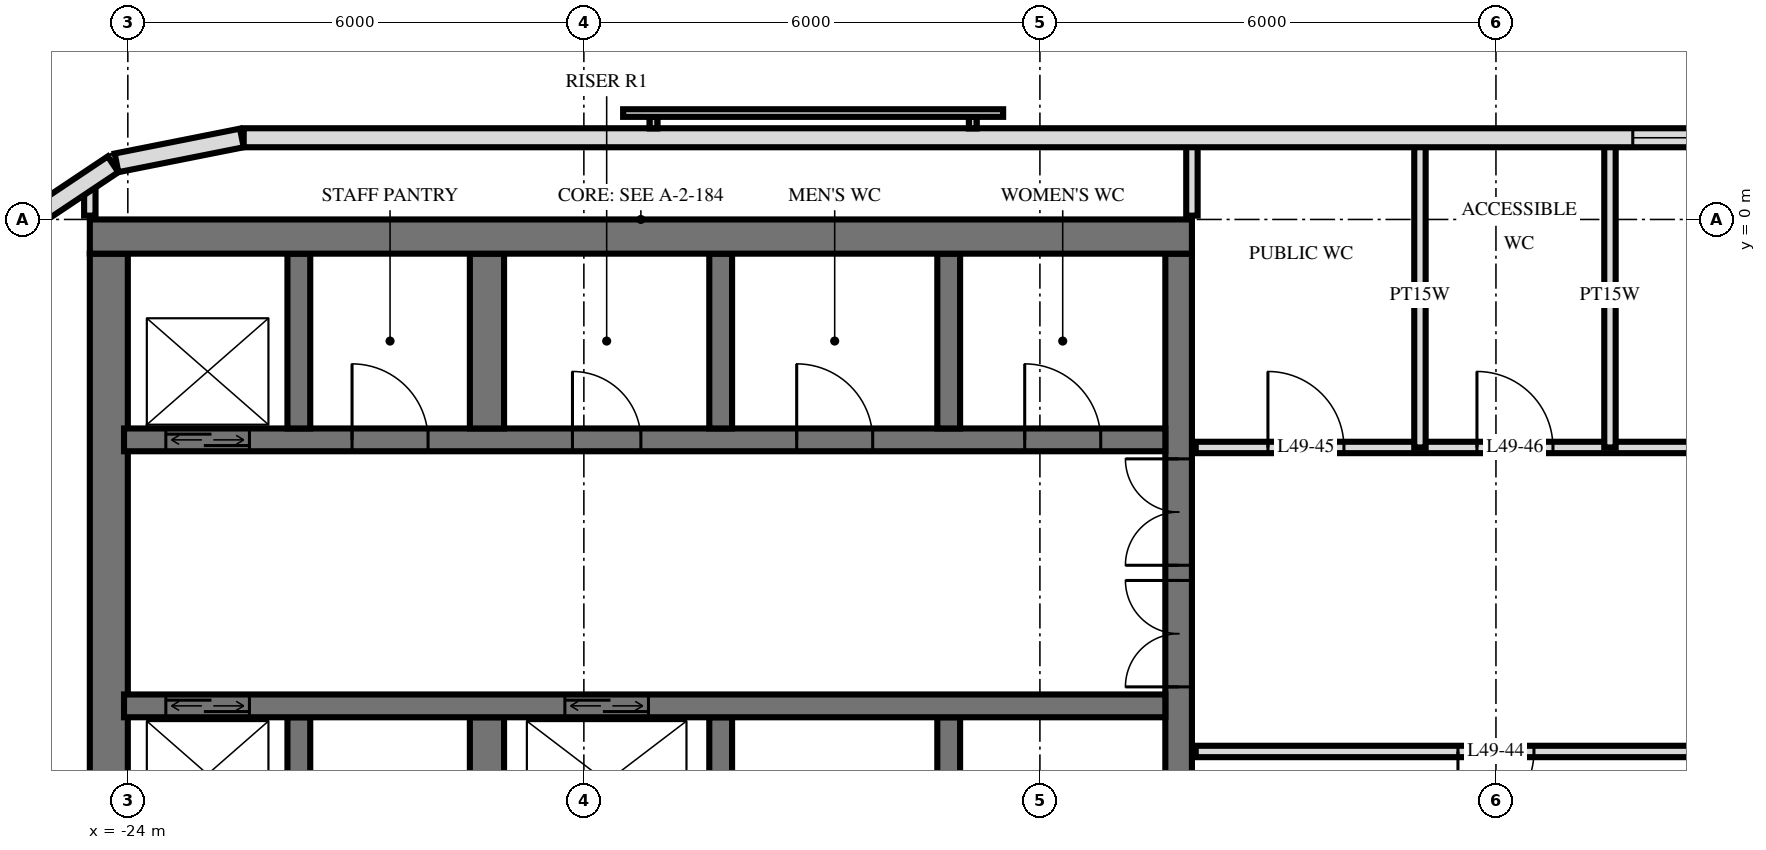
"""IFC4 building model, lengths in metres.
Left out: names, types, materials, properties, quantities, classifications, styles, units other than length and angle.
Written with IfcOpenShell. Run it as: python <this file> out.ifc"""

import sys

from ifc_helpers import new_model, si_unit, direction, frame, frame_2d, origin, place, context, subcontext, project, spatial, rectangle, extrude, element, fill, save


model = new_model("IFC4")
c1 = context("Model", 3, precision=1e-05, world=origin(), true_north=direction((0.0, 1.0)))
c2 = subcontext(c1, "Body", "Model", "MODEL_VIEW")
j1 = project(units=[si_unit("LENGTHUNIT", "METRE"), si_unit("PLANEANGLEUNIT", "RADIAN")], contexts=[c1])
p1 = place(None, origin())
s1 = spatial("IfcSite", under=j1, at=p1, CompositionType="ELEMENT")
p2 = place(p1, origin())
s2 = spatial("IfcBuilding", under=s1, at=p2, CompositionType="ELEMENT")
p3 = place(p2, frame((0.0, 0.0, 190.6)))
s3 = spatial("IfcBuildingStorey", under=s2, at=p3, CompositionType="ELEMENT", Elevation=190.6)
p4 = place(p3, frame((-24.5, -0.225, 0.0), z_axis=(0.0, 0.0, 1.0), x_axis=(1.0, 0.0, 0.0)))
e1 = element("IfcWall", 1, at=p4, inside=s3, PredefinedType="SHEAR", context=c2, shape_type="SweptSolid", body=[
    extrude(rectangle(XDim=14.5, YDim=0.45, at=frame_2d((7.25, 0.0))), origin(), (0.0, 0.0, 1.0), 3.5),
])
p5 = place(p3, frame((-10.175, -14.55, 0.0), z_axis=(0.0, 0.0, 1.0), x_axis=(0.0, 1.0, 0.0)))
e2 = element("IfcWall", 2, at=p5, inside=s3, PredefinedType="SHEAR", context=c2, shape_type="SweptSolid", body=[
    extrude(rectangle(XDim=14.1, YDim=0.35, at=frame_2d((7.05, 0.0))), origin(), (0.0, 0.0, 1.0), 3.5),
])
p6 = place(p5, frame((8.4, 0.0, 0.0)))
e3 = element("IfcOpeningElement", 3, at=p6, cuts=e2, PredefinedType="OPENING", context=c2, shape_type="SweptSolid", body=[
    extrude(rectangle(XDim=1.4, YDim=2.4, at=frame_2d((0.7, 1.2))), frame((0.0, 0.185, 0.0), z_axis=(0.0, -1.0, 0.0), x_axis=(1.0, 0.0, 0.0)), (0.0, 0.0, 1.0), 0.37),
])
p7 = place(p5, frame((10.0, 0.0, 0.0)))
e4 = element("IfcOpeningElement", 4, at=p7, cuts=e2, PredefinedType="OPENING", context=c2, shape_type="SweptSolid", body=[
    extrude(rectangle(XDim=1.4, YDim=2.4, at=frame_2d((0.7, 1.2))), frame((0.0, 0.185, 0.0), z_axis=(0.0, -1.0, 0.0), x_axis=(1.0, 0.0, 0.0)), (0.0, 0.0, 1.0), 0.37),
])
p8 = place(p5, frame((4.0, 0.0, 0.0)))
e5 = element("IfcOpeningElement", 5, at=p8, cuts=e2, PredefinedType="OPENING", context=c2, shape_type="SweptSolid", body=[
    extrude(rectangle(XDim=1.2, YDim=2.1, at=frame_2d((0.6, 1.05))), frame((0.0, 0.185, 0.0), z_axis=(0.0, -1.0, 0.0), x_axis=(1.0, 0.0, 0.0)), (0.0, 0.0, 1.0), 0.37),
])
p9 = place(p3, frame((-24.25, -14.55, 0.0), z_axis=(0.0, 0.0, 1.0), x_axis=(0.0, 1.0, 0.0)))
e6 = element("IfcWall", 6, at=p9, inside=s3, PredefinedType="SHEAR", context=c2, shape_type="SweptSolid", body=[
    extrude(rectangle(XDim=14.1, YDim=0.5, at=frame_2d((7.05, 0.0))), origin(), (0.0, 0.0, 1.0), 3.5),
])
p10 = place(p3, frame((-24.05, -2.9, 0.0), z_axis=(0.0, 0.0, 1.0), x_axis=(1.0, 0.0, 0.0)))
e7 = element("IfcWall", 7, at=p10, inside=s3, PredefinedType="SHEAR", context=c2, shape_type="SweptSolid", body=[
    extrude(rectangle(XDim=13.7, YDim=0.3, at=frame_2d((6.85, 0.0))), origin(), (0.0, 0.0, 1.0), 3.5),
])
p11 = place(p10, frame((0.55, 0.0, 0.0)))
e8 = element("IfcOpeningElement", 8, at=p11, cuts=e7, PredefinedType="OPENING", context=c2, shape_type="SweptSolid", body=[
    extrude(rectangle(XDim=1.1, YDim=2.1, at=frame_2d((0.55, 1.05))), frame((0.0, 0.16, 0.0), z_axis=(0.0, -1.0, 0.0), x_axis=(1.0, 0.0, 0.0)), (0.0, 0.0, 1.0), 0.32),
])
p12 = place(p10, frame((5.9, 0.0, 0.0)))
e9 = element("IfcOpeningElement", 9, at=p12, cuts=e7, PredefinedType="OPENING", context=c2, shape_type="SweptSolid", body=[
    extrude(rectangle(XDim=0.9, YDim=2.1, at=frame_2d((0.45, 1.05))), frame((0.0, 0.16, 0.0), z_axis=(0.0, -1.0, 0.0), x_axis=(1.0, 0.0, 0.0)), (0.0, 0.0, 1.0), 0.32),
])
p13 = place(p10, frame((11.85, 0.0, 0.0)))
e10 = element("IfcOpeningElement", 10, at=p13, cuts=e7, PredefinedType="OPENING", context=c2, shape_type="SweptSolid", body=[
    extrude(rectangle(XDim=1.0, YDim=2.1, at=frame_2d((0.5, 1.05))), frame((0.0, 0.16, 0.0), z_axis=(0.0, -1.0, 0.0), x_axis=(1.0, 0.0, 0.0)), (0.0, 0.0, 1.0), 0.32),
])
p14 = place(p10, frame((8.85, 0.0, 0.0)))
e11 = element("IfcOpeningElement", 11, at=p14, cuts=e7, PredefinedType="OPENING", context=c2, shape_type="SweptSolid", body=[
    extrude(rectangle(XDim=1.0, YDim=2.1, at=frame_2d((0.5, 1.05))), frame((0.0, 0.16, 0.0), z_axis=(0.0, -1.0, 0.0), x_axis=(1.0, 0.0, 0.0)), (0.0, 0.0, 1.0), 0.32),
])
p15 = place(p10, frame((3.0, 0.0, 0.0)))
e12 = element("IfcOpeningElement", 12, at=p15, cuts=e7, PredefinedType="OPENING", context=c2, shape_type="SweptSolid", body=[
    extrude(rectangle(XDim=1.0, YDim=2.1, at=frame_2d((0.5, 1.05))), frame((0.0, 0.16, 0.0), z_axis=(0.0, -1.0, 0.0), x_axis=(1.0, 0.0, 0.0)), (0.0, 0.0, 1.0), 0.32),
])
p16 = place(p3, frame((-24.05, -6.4, 0.0), z_axis=(0.0, 0.0, 1.0), x_axis=(1.0, 0.0, 0.0)))
e13 = element("IfcWall", 13, at=p16, inside=s3, PredefinedType="SHEAR", context=c2, shape_type="SweptSolid", body=[
    extrude(rectangle(XDim=13.7, YDim=0.3, at=frame_2d((6.85, 0.0))), origin(), (0.0, 0.0, 1.0), 3.5),
])
p17 = place(p16, frame((0.55, 0.0, 0.0)))
e14 = element("IfcOpeningElement", 14, at=p17, cuts=e13, PredefinedType="OPENING", context=c2, shape_type="SweptSolid", body=[
    extrude(rectangle(XDim=1.1, YDim=2.1, at=frame_2d((0.55, 1.05))), frame((0.0, 0.16, 0.0), z_axis=(0.0, -1.0, 0.0), x_axis=(1.0, 0.0, 0.0)), (0.0, 0.0, 1.0), 0.32),
])
p18 = place(p16, frame((5.8, 0.0, 0.0)))
e15 = element("IfcOpeningElement", 15, at=p18, cuts=e13, PredefinedType="OPENING", context=c2, shape_type="SweptSolid", body=[
    extrude(rectangle(XDim=1.1, YDim=2.1, at=frame_2d((0.55, 1.05))), frame((0.0, 0.16, 0.0), z_axis=(0.0, -1.0, 0.0), x_axis=(1.0, 0.0, 0.0)), (0.0, 0.0, 1.0), 0.32),
])
for number, where, z_axis, x_axis in (
    (16, (-13.2, -2.75, 0.0), (0.0, 0.0, 1.0), (0.0, 1.0, 0.0)),
    (17, (-13.2, -8.85, 0.0), (0.0, 0.0, 1.0), (0.0, 1.0, 0.0)),
    (18, (-16.2, -2.75, 0.0), (0.0, 0.0, 1.0), (0.0, 1.0, 0.0)),
    (19, (-16.2, -8.85, 0.0), (0.0, 0.0, 1.0), (0.0, 1.0, 0.0)),
):
    element("IfcWall", number, at=place(p3, frame(where, z_axis=z_axis, x_axis=x_axis)), inside=s3, PredefinedType="SHEAR", context=c2, shape_type="SweptSolid", body=[
        extrude(rectangle(XDim=2.3, YDim=0.3, at=frame_2d((1.15, 0.0))), origin(), (0.0, 0.0, 1.0), 3.5),
    ])
for number, where, z_axis, x_axis in (
    (20, (-19.275, -2.75, 0.0), (0.0, 0.0, 1.0), (0.0, 1.0, 0.0)),
    (21, (-19.275, -8.85, 0.0), (0.0, 0.0, 1.0), (0.0, 1.0, 0.0)),
):
    element("IfcWall", number, at=place(p3, frame(where, z_axis=z_axis, x_axis=x_axis)), inside=s3, PredefinedType="SHEAR", context=c2, shape_type="SweptSolid", body=[
        extrude(rectangle(XDim=2.3, YDim=0.45, at=frame_2d((1.15, 0.0))), origin(), (0.0, 0.0, 1.0), 3.5),
    ])
for number, where, z_axis, x_axis in (
    (22, (-21.75, -2.75, 0.0), (0.0, 0.0, 1.0), (0.0, 1.0, 0.0)),
    (23, (-21.75, -8.85, 0.0), (0.0, 0.0, 1.0), (0.0, 1.0, 0.0)),
):
    element("IfcWall", number, at=place(p3, frame(where, z_axis=z_axis, x_axis=x_axis)), inside=s3, PredefinedType="SHEAR", context=c2, shape_type="SweptSolid", body=[
        extrude(rectangle(XDim=2.3, YDim=0.3, at=frame_2d((1.15, 0.0))), origin(), (0.0, 0.0, 1.0), 3.5),
    ])
p19 = place(p3, frame((22.475, 1.075, 0.0), z_axis=(0.0, 0.0, 1.0), x_axis=(-1.0, 0.0, 0.0)))
e24 = element("IfcWall", 24, at=p19, inside=s3, PredefinedType="SOLIDWALL", context=c2, shape_type="SweptSolid", body=[
    extrude(rectangle(XDim=44.951, YDim=0.25, at=frame_2d((22.475, 0.0))), origin(), (0.0, 0.0, 1.0), 3.22),
])
p20 = place(p19, frame((15.275, 0.0, 0.9)))
e25 = element("IfcOpeningElement", 25, at=p20, cuts=e24, PredefinedType="OPENING", context=c2, shape_type="SweptSolid", body=[
    extrude(rectangle(XDim=2.4, YDim=1.5, at=frame_2d((1.2, 0.75))), frame((0.0, 0.135, 0.0), z_axis=(0.0, -1.0, 0.0), x_axis=(1.0, 0.0, 0.0)), (0.0, 0.0, 1.0), 0.27),
])
p21 = place(p19, frame((21.275, 0.0, 0.9)))
e26 = element("IfcOpeningElement", 26, at=p21, cuts=e24, PredefinedType="OPENING", context=c2, shape_type="SweptSolid", body=[
    extrude(rectangle(XDim=2.4, YDim=1.5, at=frame_2d((1.2, 0.75))), frame((0.0, 0.135, 0.0), z_axis=(0.0, -1.0, 0.0), x_axis=(1.0, 0.0, 0.0)), (0.0, 0.0, 1.0), 0.27),
])
p22 = place(p19, frame((24.275, 0.0, 0.9)))
e27 = element("IfcOpeningElement", 27, at=p22, cuts=e24, PredefinedType="OPENING", context=c2, shape_type="SweptSolid", body=[
    extrude(rectangle(XDim=2.4, YDim=1.5, at=frame_2d((1.2, 0.75))), frame((0.0, 0.135, 0.0), z_axis=(0.0, -1.0, 0.0), x_axis=(1.0, 0.0, 0.0)), (0.0, 0.0, 1.0), 0.27),
])
p23 = place(p3, frame((-22.5, 1.073, 0.0), z_axis=(0.0, 0.0, 1.0), x_axis=(-0.980803419081, -0.194999110559, 0.0)))
e28 = element("IfcWall", 28, at=p23, inside=s3, PredefinedType="SOLIDWALL", context=c2, shape_type="SweptSolid", body=[
    extrude(rectangle(XDim=1.681, YDim=0.25, at=frame_2d((0.841, 0.0))), origin(), (0.0, 0.0, 1.0), 3.22),
])
p24 = place(p3, frame((-24.194, 0.726, 0.0), z_axis=(0.0, 0.0, 1.0), x_axis=(-0.831482937015, -0.55555029066, 0.0)))
e29 = element("IfcWall", 29, at=p24, inside=s3, PredefinedType="SOLIDWALL", context=c2, shape_type="SweptSolid", body=[
    extrude(rectangle(XDim=1.656, YDim=0.25, at=frame_2d((0.828, 0.0))), origin(), (0.0, 0.0, 1.0), 3.22),
])
for number, where, z_axis, x_axis in (
    (30, (-4.5, -3.0, 0.0), (0.0, 0.0, 1.0), (0.0, 1.0, 0.0)),
    (31, (-7.0, -3.0, 0.0), (0.0, 0.0, 1.0), (0.0, 1.0, 0.0)),
):
    element("IfcWall", number, at=place(p3, frame(where, z_axis=z_axis, x_axis=x_axis)), inside=s3, PredefinedType="PLUMBINGWALL", context=c2, shape_type="SweptSolid", body=[
        extrude(rectangle(XDim=4.02, YDim=0.15, at=frame_2d((2.01, 0.0))), origin(), (0.0, 0.0, 1.0), 3.22),
    ])
p25 = place(p3, frame((-10.0, 0.05, 0.0), z_axis=(0.0, 0.0, 1.0), x_axis=(0.0, 1.0, 0.0)))
e32 = element("IfcWall", 32, at=p25, inside=s3, PredefinedType="PLUMBINGWALL", context=c2, shape_type="SweptSolid", body=[
    extrude(rectangle(XDim=0.97, YDim=0.15, at=frame_2d((0.485, 0.0))), origin(), (0.0, 0.0, 1.0), 3.22),
])
p26 = place(p3, frame((-24.5, 0.05, 0.0), z_axis=(0.0, 0.0, 1.0), x_axis=(0.0, 1.0, 0.0)))
e33 = element("IfcWall", 33, at=p26, inside=s3, PredefinedType="PARTITIONING", context=c2, shape_type="SweptSolid", body=[
    extrude(rectangle(XDim=0.405, YDim=0.15, at=frame_2d((0.203, 0.0))), origin(), (0.0, 0.0, 1.0), 3.22),
])
p27 = place(p3, frame((-9.95, -7.0, 0.0), z_axis=(0.0, 0.0, 1.0), x_axis=(1.0, 0.0, 0.0)))
e34 = element("IfcWall", 34, at=p27, inside=s3, PredefinedType="PARTITIONING", context=c2, shape_type="SweptSolid", body=[
    extrude(rectangle(XDim=19.9, YDim=0.15, at=frame_2d((9.95, 0.0))), origin(), (0.0, 0.0, 1.0), 3.22),
])
p28 = place(p27, frame((9.45, 0.0, 0.0)))
e35 = element("IfcOpeningElement", 35, at=p28, cuts=e34, PredefinedType="OPENING", context=c2, shape_type="SweptSolid", body=[
    extrude(rectangle(XDim=1.0, YDim=2.1, at=frame_2d((0.5, 1.05))), frame((0.0, 0.085, 0.0), z_axis=(0.0, -1.0, 0.0), x_axis=(1.0, 0.0, 0.0)), (0.0, 0.0, 1.0), 0.17),
])
p29 = place(p27, frame((3.45, 0.0, 0.0)))
e36 = element("IfcOpeningElement", 36, at=p29, cuts=e34, PredefinedType="OPENING", context=c2, shape_type="SweptSolid", body=[
    extrude(rectangle(XDim=1.0, YDim=2.1, at=frame_2d((0.5, 1.05))), frame((0.0, 0.085, 0.0), z_axis=(0.0, -1.0, 0.0), x_axis=(1.0, 0.0, 0.0)), (0.0, 0.0, 1.0), 0.17),
])
p30 = place(p3, frame((-9.95, -3.0, 0.0), z_axis=(0.0, 0.0, 1.0), x_axis=(1.0, 0.0, 0.0)))
e37 = element("IfcWall", 37, at=p30, inside=s3, PredefinedType="PARTITIONING", context=c2, shape_type="SweptSolid", body=[
    extrude(rectangle(XDim=19.9, YDim=0.15, at=frame_2d((9.95, 0.0))), origin(), (0.0, 0.0, 1.0), 3.22),
])
p31 = place(p30, frame((0.95, 0.0, 0.0)))
e38 = element("IfcOpeningElement", 38, at=p31, cuts=e37, PredefinedType="OPENING", context=c2, shape_type="SweptSolid", body=[
    extrude(rectangle(XDim=1.0, YDim=2.1, at=frame_2d((0.5, 1.05))), frame((0.0, 0.085, 0.0), z_axis=(0.0, -1.0, 0.0), x_axis=(1.0, 0.0, 0.0)), (0.0, 0.0, 1.0), 0.17),
])
p32 = place(p30, frame((3.7, 0.0, 0.0)))
e39 = element("IfcOpeningElement", 39, at=p32, cuts=e37, PredefinedType="OPENING", context=c2, shape_type="SweptSolid", body=[
    extrude(rectangle(XDim=1.0, YDim=2.1, at=frame_2d((0.5, 1.05))), frame((0.0, 0.085, 0.0), z_axis=(0.0, -1.0, 0.0), x_axis=(1.0, 0.0, 0.0)), (0.0, 0.0, 1.0), 0.17),
])
p33 = place(p30, frame((8.45, 0.0, 0.0)))
e40 = element("IfcOpeningElement", 40, at=p33, cuts=e37, PredefinedType="OPENING", context=c2, shape_type="SweptSolid", body=[
    extrude(rectangle(XDim=1.0, YDim=2.1, at=frame_2d((0.5, 1.05))), frame((0.0, 0.085, 0.0), z_axis=(0.0, -1.0, 0.0), x_axis=(1.0, 0.0, 0.0)), (0.0, 0.0, 1.0), 0.17),
])
p34 = place(p30, frame((15.7, 0.0, 0.0)))
e41 = element("IfcOpeningElement", 41, at=p34, cuts=e37, PredefinedType="OPENING", context=c2, shape_type="SweptSolid", body=[
    extrude(rectangle(XDim=1.0, YDim=2.1, at=frame_2d((0.5, 1.05))), frame((0.0, 0.085, 0.0), z_axis=(0.0, -1.0, 0.0), x_axis=(1.0, 0.0, 0.0)), (0.0, 0.0, 1.0), 0.17),
])
p35 = place(p22, origin())
e42 = element("IfcWindow", 42, at=p35, inside=s3, PartitioningType="SINGLE_PANEL", PredefinedType="WINDOW", context=c2, shape_type="SweptSolid", body=[
    extrude(rectangle(XDim=2.4, YDim=1.5, at=frame_2d((1.2, 0.75))), frame((0.0, 0.03, 0.0), z_axis=(0.0, -1.0, 0.0), x_axis=(1.0, 0.0, 0.0)), (0.0, 0.0, 1.0), 0.06),
])
fill(e27, e42)
p36 = place(p11, origin())
e43 = element("IfcDoor", 43, at=p36, inside=s3, OperationType="DOUBLE_DOOR_SLIDING", PredefinedType="USERDEFINED", context=c2, shape_type="SweptSolid", body=[
    extrude(rectangle(XDim=1.1, YDim=2.1, at=frame_2d((0.55, 1.05))), frame((0.0, 0.025, 0.0), z_axis=(0.0, -1.0, 0.0), x_axis=(1.0, 0.0, 0.0)), (0.0, 0.0, 1.0), 0.05),
])
fill(e8, e43)
p37 = place(p17, origin())
e44 = element("IfcDoor", 44, at=p37, inside=s3, OperationType="DOUBLE_DOOR_SLIDING", PredefinedType="USERDEFINED", context=c2, shape_type="SweptSolid", body=[
    extrude(rectangle(XDim=1.1, YDim=2.1, at=frame_2d((0.55, 1.05))), frame((0.0, 0.025, 0.0), z_axis=(0.0, -1.0, 0.0), x_axis=(1.0, 0.0, 0.0)), (0.0, 0.0, 1.0), 0.05),
])
fill(e14, e44)
p38 = place(p18, origin())
e45 = element("IfcDoor", 45, at=p38, inside=s3, OperationType="DOUBLE_DOOR_SLIDING", PredefinedType="USERDEFINED", context=c2, shape_type="SweptSolid", body=[
    extrude(rectangle(XDim=1.1, YDim=2.1, at=frame_2d((0.55, 1.05))), frame((0.0, 0.025, 0.0), z_axis=(0.0, -1.0, 0.0), x_axis=(1.0, 0.0, 0.0)), (0.0, 0.0, 1.0), 0.05),
])
fill(e15, e45)
p39 = place(p6, origin())
e46 = element("IfcDoor", 46, at=p39, inside=s3, OperationType="DOUBLE_DOOR_SINGLE_SWING", PredefinedType="DOOR", context=c2, shape_type="SweptSolid", body=[
    extrude(rectangle(XDim=1.4, YDim=2.4, at=frame_2d((0.7, 1.2))), frame((0.0, 0.025, 0.0), z_axis=(0.0, -1.0, 0.0), x_axis=(1.0, 0.0, 0.0)), (0.0, 0.0, 1.0), 0.05),
])
fill(e3, e46)
p40 = place(p7, origin())
e47 = element("IfcDoor", 47, at=p40, inside=s3, OperationType="DOUBLE_DOOR_SINGLE_SWING", PredefinedType="DOOR", context=c2, shape_type="SweptSolid", body=[
    extrude(rectangle(XDim=1.4, YDim=2.4, at=frame_2d((0.7, 1.2))), frame((0.0, 0.025, 0.0), z_axis=(0.0, -1.0, 0.0), x_axis=(1.0, 0.0, 0.0)), (0.0, 0.0, 1.0), 0.05),
])
fill(e4, e47)
p41 = place(p12, origin())
e48 = element("IfcDoor", 48, at=p41, inside=s3, OperationType="SINGLE_SWING_RIGHT", PredefinedType="DOOR", context=c2, shape_type="SweptSolid", body=[
    extrude(rectangle(XDim=0.9, YDim=2.1, at=frame_2d((0.45, 1.05))), frame((0.0, 0.025, 0.0), z_axis=(0.0, -1.0, 0.0), x_axis=(1.0, 0.0, 0.0)), (0.0, 0.0, 1.0), 0.05),
])
fill(e9, e48)
p42 = place(p13, origin())
e49 = element("IfcDoor", 49, at=p42, inside=s3, OperationType="SINGLE_SWING_RIGHT", PredefinedType="DOOR", context=c2, shape_type="SweptSolid", body=[
    extrude(rectangle(XDim=1.0, YDim=2.1, at=frame_2d((0.5, 1.05))), frame((0.0, 0.025, 0.0), z_axis=(0.0, -1.0, 0.0), x_axis=(1.0, 0.0, 0.0)), (0.0, 0.0, 1.0), 0.05),
])
fill(e10, e49)
p43 = place(p14, origin())
e50 = element("IfcDoor", 50, at=p43, inside=s3, OperationType="SINGLE_SWING_RIGHT", PredefinedType="DOOR", context=c2, shape_type="SweptSolid", body=[
    extrude(rectangle(XDim=1.0, YDim=2.1, at=frame_2d((0.5, 1.05))), frame((0.0, 0.025, 0.0), z_axis=(0.0, -1.0, 0.0), x_axis=(1.0, 0.0, 0.0)), (0.0, 0.0, 1.0), 0.05),
])
fill(e11, e50)
p44 = place(p15, origin())
e51 = element("IfcDoor", 51, at=p44, inside=s3, OperationType="SINGLE_SWING_RIGHT", PredefinedType="DOOR", context=c2, shape_type="SweptSolid", body=[
    extrude(rectangle(XDim=1.0, YDim=2.1, at=frame_2d((0.5, 1.05))), frame((0.0, 0.025, 0.0), z_axis=(0.0, -1.0, 0.0), x_axis=(1.0, 0.0, 0.0)), (0.0, 0.0, 1.0), 0.05),
])
fill(e12, e51)
p45 = place(p29, frame((0.5, 0.0, 0.0), z_axis=(0.0, 0.0, 1.0), x_axis=(-1.0, 0.0, 0.0)))
e52 = element("IfcDoor", 52, at=p45, inside=s3, OperationType="SINGLE_SWING_LEFT", PredefinedType="DOOR", context=c2, shape_type="SweptSolid", body=[
    extrude(rectangle(XDim=1.0, YDim=2.1, at=frame_2d((0.0, 1.05))), frame((0.0, -0.025, 0.0), z_axis=(0.0, 1.0, 0.0), x_axis=(-1.0, 0.0, 0.0)), (0.0, 0.0, 1.0), 0.05),
])
fill(e36, e52)
p46 = place(p31, origin())
e53 = element("IfcDoor", 53, at=p46, inside=s3, OperationType="SINGLE_SWING_RIGHT", PredefinedType="DOOR", context=c2, shape_type="SweptSolid", body=[
    extrude(rectangle(XDim=1.0, YDim=2.1, at=frame_2d((0.5, 1.05))), frame((0.0, 0.025, 0.0), z_axis=(0.0, -1.0, 0.0), x_axis=(1.0, 0.0, 0.0)), (0.0, 0.0, 1.0), 0.05),
])
fill(e38, e53)
p47 = place(p32, origin())
e54 = element("IfcDoor", 54, at=p47, inside=s3, OperationType="SINGLE_SWING_RIGHT", PredefinedType="DOOR", context=c2, shape_type="SweptSolid", body=[
    extrude(rectangle(XDim=1.0, YDim=2.1, at=frame_2d((0.5, 1.05))), frame((0.0, 0.025, 0.0), z_axis=(0.0, -1.0, 0.0), x_axis=(1.0, 0.0, 0.0)), (0.0, 0.0, 1.0), 0.05),
])
fill(e39, e54)
save(model, sys.argv[1])
